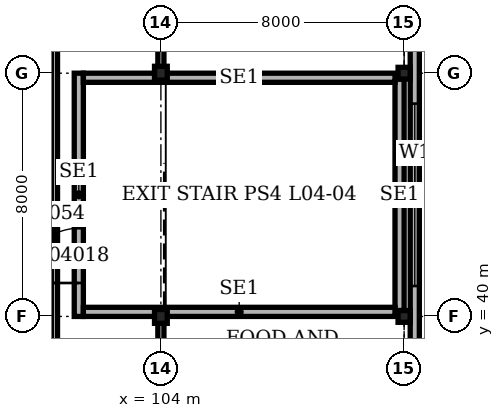
"""IFC4 building model, lengths in metres.
Left out: names, types, materials, properties, quantities, classifications, styles, units other than length and angle.
Written with IfcOpenShell. Run it as: python <this file> out.ifc"""

import sys

from ifc_helpers import new_model, si_unit, direction, frame, frame_2d, origin, origin_2d, place, context, subcontext, project, spatial, rectangle, i_section, extrude, element, fill, save


model = new_model("IFC4")
c1 = context("Model", 3, precision=1e-05, world=origin(), true_north=direction((0.0, 1.0)))
c2 = subcontext(c1, "Body", "Model", "MODEL_VIEW")
j1 = project(units=[si_unit("LENGTHUNIT", "METRE"), si_unit("PLANEANGLEUNIT", "RADIAN")], contexts=[c1])
p1 = place(None, origin())
s1 = spatial("IfcSite", under=j1, at=p1, CompositionType="ELEMENT")
p2 = place(p1, origin())
s2 = spatial("IfcBuilding", under=s1, at=p2, CompositionType="ELEMENT")
p3 = place(p2, frame((0.0, 0.0, 19.9)))
s3 = spatial("IfcBuildingStorey", under=s2, at=p3, CompositionType="ELEMENT", Elevation=19.9)
for number, where, z_axis, x_axis in (
    (1, (104.0, 40.0, 0.0), (0.0, 0.0, 1.0), (1.0, 0.0, 0.0)),
    (2, (104.0, 48.0, 0.0), (0.0, 0.0, 1.0), (1.0, 0.0, 0.0)),
):
    element("IfcColumn", number, at=place(p3, frame(where, z_axis=z_axis, x_axis=x_axis)), inside=s3, PredefinedType="COLUMN", context=c2, shape_type="SweptSolid", body=[
        extrude(i_section(OverallWidth=0.419, OverallDepth=0.455, WebThickness=0.042, FlangeThickness=0.068, at=origin_2d()), origin(), (0.0, 0.0, 1.0), 6.0),
    ])
for number, where, z_axis, x_axis in (
    (3, (112.0, 40.0, 0.0), (0.0, 0.0, 1.0), (1.0, 0.0, 0.0)),
    (4, (112.0, 48.0, 0.0), (0.0, 0.0, 1.0), (1.0, 0.0, 0.0)),
):
    element("IfcColumn", number, at=place(p3, frame(where, z_axis=z_axis, x_axis=x_axis)), inside=s3, PredefinedType="COLUMN", context=c2, shape_type="SweptSolid", body=[
        extrude(i_section(OverallWidth=0.399, OverallDepth=0.386, WebThickness=0.021, FlangeThickness=0.033, at=origin_2d()), origin(), (0.0, 0.0, 1.0), 6.0),
    ])
p4 = place(p3, frame((112.35, -0.35, 0.0), z_axis=(0.0, 0.0, 1.0), x_axis=(0.0, 1.0, 0.0)))
e5 = element("IfcWall", 5, at=p4, inside=s3, PredefinedType="SOLIDWALL", context=c2, shape_type="SweptSolid", body=[
    extrude(rectangle(XDim=112.7, YDim=0.3, at=frame_2d((56.35, 0.0))), origin(), (0.0, 0.0, 1.0), 6.0),
])
p5 = place(p4, frame((1.35, 0.0, 1.0)))
e6 = element("IfcOpeningElement", 6, at=p5, cuts=e5, PredefinedType="OPENING", context=c2, shape_type="SweptSolid", body=[
    extrude(rectangle(XDim=6.0, YDim=1.5, at=frame_2d((3.0, 0.75))), frame((0.0, 0.16, 0.0), z_axis=(0.0, -1.0, 0.0), x_axis=(1.0, 0.0, 0.0)), (0.0, 0.0, 1.0), 0.32),
])
p6 = place(p4, frame((9.35, 0.0, 1.0)))
e7 = element("IfcOpeningElement", 7, at=p6, cuts=e5, PredefinedType="OPENING", context=c2, shape_type="SweptSolid", body=[
    extrude(rectangle(XDim=6.0, YDim=1.5, at=frame_2d((3.0, 0.75))), frame((0.0, 0.16, 0.0), z_axis=(0.0, -1.0, 0.0), x_axis=(1.0, 0.0, 0.0)), (0.0, 0.0, 1.0), 0.32),
])
p7 = place(p4, frame((17.35, 0.0, 1.0)))
e8 = element("IfcOpeningElement", 8, at=p7, cuts=e5, PredefinedType="OPENING", context=c2, shape_type="SweptSolid", body=[
    extrude(rectangle(XDim=6.0, YDim=1.5, at=frame_2d((3.0, 0.75))), frame((0.0, 0.16, 0.0), z_axis=(0.0, -1.0, 0.0), x_axis=(1.0, 0.0, 0.0)), (0.0, 0.0, 1.0), 0.32),
])
p8 = place(p4, frame((25.35, 0.0, 1.0)))
e9 = element("IfcOpeningElement", 9, at=p8, cuts=e5, PredefinedType="OPENING", context=c2, shape_type="SweptSolid", body=[
    extrude(rectangle(XDim=6.0, YDim=1.5, at=frame_2d((3.0, 0.75))), frame((0.0, 0.16, 0.0), z_axis=(0.0, -1.0, 0.0), x_axis=(1.0, 0.0, 0.0)), (0.0, 0.0, 1.0), 0.32),
])
p9 = place(p4, frame((33.35, 0.0, 1.0)))
e10 = element("IfcOpeningElement", 10, at=p9, cuts=e5, PredefinedType="OPENING", context=c2, shape_type="SweptSolid", body=[
    extrude(rectangle(XDim=6.0, YDim=1.5, at=frame_2d((3.0, 0.75))), frame((0.0, 0.16, 0.0), z_axis=(0.0, -1.0, 0.0), x_axis=(1.0, 0.0, 0.0)), (0.0, 0.0, 1.0), 0.32),
])
p10 = place(p4, frame((41.35, 0.0, 1.0)))
e11 = element("IfcOpeningElement", 11, at=p10, cuts=e5, PredefinedType="OPENING", context=c2, shape_type="SweptSolid", body=[
    extrude(rectangle(XDim=6.0, YDim=1.5, at=frame_2d((3.0, 0.75))), frame((0.0, 0.16, 0.0), z_axis=(0.0, -1.0, 0.0), x_axis=(1.0, 0.0, 0.0)), (0.0, 0.0, 1.0), 0.32),
])
p11 = place(p4, frame((49.35, 0.0, 1.0)))
e12 = element("IfcOpeningElement", 12, at=p11, cuts=e5, PredefinedType="OPENING", context=c2, shape_type="SweptSolid", body=[
    extrude(rectangle(XDim=6.0, YDim=1.5, at=frame_2d((3.0, 0.75))), frame((0.0, 0.16, 0.0), z_axis=(0.0, -1.0, 0.0), x_axis=(1.0, 0.0, 0.0)), (0.0, 0.0, 1.0), 0.32),
])
p12 = place(p4, frame((57.35, 0.0, 1.0)))
e13 = element("IfcOpeningElement", 13, at=p12, cuts=e5, PredefinedType="OPENING", context=c2, shape_type="SweptSolid", body=[
    extrude(rectangle(XDim=6.0, YDim=1.5, at=frame_2d((3.0, 0.75))), frame((0.0, 0.16, 0.0), z_axis=(0.0, -1.0, 0.0), x_axis=(1.0, 0.0, 0.0)), (0.0, 0.0, 1.0), 0.32),
])
p13 = place(p4, frame((65.35, 0.0, 1.0)))
e14 = element("IfcOpeningElement", 14, at=p13, cuts=e5, PredefinedType="OPENING", context=c2, shape_type="SweptSolid", body=[
    extrude(rectangle(XDim=6.0, YDim=1.5, at=frame_2d((3.0, 0.75))), frame((0.0, 0.16, 0.0), z_axis=(0.0, -1.0, 0.0), x_axis=(1.0, 0.0, 0.0)), (0.0, 0.0, 1.0), 0.32),
])
p14 = place(p4, frame((73.35, 0.0, 1.0)))
e15 = element("IfcOpeningElement", 15, at=p14, cuts=e5, PredefinedType="OPENING", context=c2, shape_type="SweptSolid", body=[
    extrude(rectangle(XDim=6.0, YDim=1.5, at=frame_2d((3.0, 0.75))), frame((0.0, 0.16, 0.0), z_axis=(0.0, -1.0, 0.0), x_axis=(1.0, 0.0, 0.0)), (0.0, 0.0, 1.0), 0.32),
])
p15 = place(p4, frame((81.35, 0.0, 1.0)))
e16 = element("IfcOpeningElement", 16, at=p15, cuts=e5, PredefinedType="OPENING", context=c2, shape_type="SweptSolid", body=[
    extrude(rectangle(XDim=6.0, YDim=1.5, at=frame_2d((3.0, 0.75))), frame((0.0, 0.16, 0.0), z_axis=(0.0, -1.0, 0.0), x_axis=(1.0, 0.0, 0.0)), (0.0, 0.0, 1.0), 0.32),
])
p16 = place(p4, frame((89.35, 0.0, 1.0)))
e17 = element("IfcOpeningElement", 17, at=p16, cuts=e5, PredefinedType="OPENING", context=c2, shape_type="SweptSolid", body=[
    extrude(rectangle(XDim=6.0, YDim=1.5, at=frame_2d((3.0, 0.75))), frame((0.0, 0.16, 0.0), z_axis=(0.0, -1.0, 0.0), x_axis=(1.0, 0.0, 0.0)), (0.0, 0.0, 1.0), 0.32),
])
p17 = place(p4, frame((97.35, 0.0, 1.0)))
e18 = element("IfcOpeningElement", 18, at=p17, cuts=e5, PredefinedType="OPENING", context=c2, shape_type="SweptSolid", body=[
    extrude(rectangle(XDim=6.0, YDim=1.5, at=frame_2d((3.0, 0.75))), frame((0.0, 0.16, 0.0), z_axis=(0.0, -1.0, 0.0), x_axis=(1.0, 0.0, 0.0)), (0.0, 0.0, 1.0), 0.32),
])
p18 = place(p4, frame((105.35, 0.0, 1.0)))
e19 = element("IfcOpeningElement", 19, at=p18, cuts=e5, PredefinedType="OPENING", context=c2, shape_type="SweptSolid", body=[
    extrude(rectangle(XDim=6.0, YDim=1.5, at=frame_2d((3.0, 0.75))), frame((0.0, 0.16, 0.0), z_axis=(0.0, -1.0, 0.0), x_axis=(1.0, 0.0, 0.0)), (0.0, 0.0, 1.0), 0.32),
])
p19 = place(p3, frame((101.3, 40.0, 0.0), z_axis=(0.0, 0.0, 1.0), x_axis=(0.0, 1.0, 0.0)))
e20 = element("IfcWall", 20, at=p19, inside=s3, PredefinedType="SOLIDWALL", context=c2, shape_type="SweptSolid", body=[
    extrude(rectangle(XDim=8.0, YDim=0.3, at=frame_2d((4.0, 0.0))), origin(), (0.0, 0.0, 1.0), 5.75),
])
p20 = place(p19, frame((1.1, 0.0, 0.0)))
e21 = element("IfcOpeningElement", 21, at=p20, cuts=e20, PredefinedType="OPENING", context=c2, shape_type="SweptSolid", body=[
    extrude(rectangle(XDim=1.8, YDim=2.1, at=frame_2d((0.9, 1.05))), frame((0.0, 0.16, 0.0), z_axis=(0.0, -1.0, 0.0), x_axis=(1.0, 0.0, 0.0)), (0.0, 0.0, 1.0), 0.32),
])
p21 = place(p3, frame((111.85, 40.193, 0.0), z_axis=(0.0, 0.0, 1.0), x_axis=(0.0, 1.0, 0.0)))
e22 = element("IfcWall", 22, at=p21, inside=s3, PredefinedType="SOLIDWALL", context=c2, shape_type="SweptSolid", body=[
    extrude(rectangle(XDim=7.614, YDim=0.3, at=frame_2d((3.807, 0.0))), origin(), (0.0, 0.0, 1.0), 5.75),
])
for number, where, z_axis, x_axis in (
    (23, (101.45, 40.15, 0.0), (0.0, 0.0, 1.0), (1.0, 0.0, 0.0)),
    (24, (101.45, 47.85, 0.0), (0.0, 0.0, 1.0), (1.0, 0.0, 0.0)),
):
    element("IfcWall", number, at=place(p3, frame(where, z_axis=z_axis, x_axis=x_axis)), inside=s3, PredefinedType="SOLIDWALL", context=c2, shape_type="SweptSolid", body=[
        extrude(rectangle(XDim=10.25, YDim=0.3, at=frame_2d((5.125, 0.0))), origin(), (0.0, 0.0, 1.0), 5.75),
    ])
p22 = place(p3, frame((100.5, 8.6, 0.0), z_axis=(0.0, 0.0, 1.0), x_axis=(0.0, 1.0, 0.0)))
e25 = element("IfcWall", 25, at=p22, inside=s3, PredefinedType="PARTITIONING", context=c2, shape_type="SweptSolid", body=[
    extrude(rectangle(XDim=55.3, YDim=0.2, at=frame_2d((27.65, 0.0))), origin(), (0.0, 0.0, 1.0), 5.75),
])
p23 = place(p22, frame((1.0, 0.0, 0.0)))
e26 = element("IfcOpeningElement", 26, at=p23, cuts=e25, PredefinedType="OPENING", context=c2, shape_type="SweptSolid", body=[
    extrude(rectangle(XDim=1.8, YDim=2.4, at=frame_2d((0.9, 1.2))), frame((0.0, 0.11, 0.0), z_axis=(0.0, -1.0, 0.0), x_axis=(1.0, 0.0, 0.0)), (0.0, 0.0, 1.0), 0.22),
])
p24 = place(p22, frame((8.5, 0.0, 0.0)))
e27 = element("IfcOpeningElement", 27, at=p24, cuts=e25, PredefinedType="OPENING", context=c2, shape_type="SweptSolid", body=[
    extrude(rectangle(XDim=1.8, YDim=2.4, at=frame_2d((0.9, 1.2))), frame((0.0, 0.11, 0.0), z_axis=(0.0, -1.0, 0.0), x_axis=(1.0, 0.0, 0.0)), (0.0, 0.0, 1.0), 0.22),
])
p25 = place(p22, frame((16.5, 0.0, 0.0)))
e28 = element("IfcOpeningElement", 28, at=p25, cuts=e25, PredefinedType="OPENING", context=c2, shape_type="SweptSolid", body=[
    extrude(rectangle(XDim=1.8, YDim=2.4, at=frame_2d((0.9, 1.2))), frame((0.0, 0.11, 0.0), z_axis=(0.0, -1.0, 0.0), x_axis=(1.0, 0.0, 0.0)), (0.0, 0.0, 1.0), 0.22),
])
p26 = place(p22, frame((24.5, 0.0, 0.0)))
e29 = element("IfcOpeningElement", 29, at=p26, cuts=e25, PredefinedType="OPENING", context=c2, shape_type="SweptSolid", body=[
    extrude(rectangle(XDim=1.8, YDim=2.4, at=frame_2d((0.9, 1.2))), frame((0.0, 0.11, 0.0), z_axis=(0.0, -1.0, 0.0), x_axis=(1.0, 0.0, 0.0)), (0.0, 0.0, 1.0), 0.22),
])
p27 = place(p22, frame((32.5, 0.0, 0.0)))
e30 = element("IfcOpeningElement", 30, at=p27, cuts=e25, PredefinedType="OPENING", context=c2, shape_type="SweptSolid", body=[
    extrude(rectangle(XDim=1.8, YDim=2.4, at=frame_2d((0.9, 1.2))), frame((0.0, 0.11, 0.0), z_axis=(0.0, -1.0, 0.0), x_axis=(1.0, 0.0, 0.0)), (0.0, 0.0, 1.0), 0.22),
])
p28 = place(p22, frame((40.5, 0.0, 0.0)))
e31 = element("IfcOpeningElement", 31, at=p28, cuts=e25, PredefinedType="OPENING", context=c2, shape_type="SweptSolid", body=[
    extrude(rectangle(XDim=1.8, YDim=2.4, at=frame_2d((0.9, 1.2))), frame((0.0, 0.11, 0.0), z_axis=(0.0, -1.0, 0.0), x_axis=(1.0, 0.0, 0.0)), (0.0, 0.0, 1.0), 0.22),
])
p29 = place(p22, frame((48.5, 0.0, 0.0)))
e32 = element("IfcOpeningElement", 32, at=p29, cuts=e25, PredefinedType="OPENING", context=c2, shape_type="SweptSolid", body=[
    extrude(rectangle(XDim=1.8, YDim=2.4, at=frame_2d((0.9, 1.2))), frame((0.0, 0.11, 0.0), z_axis=(0.0, -1.0, 0.0), x_axis=(1.0, 0.0, 0.0)), (0.0, 0.0, 1.0), 0.22),
])
p30 = place(p3, frame((104.0, -0.15, 0.0), z_axis=(0.0, 0.0, 1.0), x_axis=(0.0, 1.0, 0.0)))
e33 = element("IfcWall", 33, at=p30, inside=s3, PredefinedType="PARTITIONING", context=c2, shape_type="SweptSolid", body=[
    extrude(rectangle(XDim=40.05, YDim=0.2, at=frame_2d((20.025, 0.0))), origin(), (0.0, 0.0, 1.0), 4.978),
])
p31 = place(p30, frame((17.55, 0.0, 0.0)))
e34 = element("IfcOpeningElement", 34, at=p31, cuts=e33, PredefinedType="OPENING", context=c2, shape_type="SweptSolid", body=[
    extrude(rectangle(XDim=1.2, YDim=2.1, at=frame_2d((0.6, 1.05))), frame((0.0, 0.11, 0.0), z_axis=(0.0, -1.0, 0.0), x_axis=(1.0, 0.0, 0.0)), (0.0, 0.0, 1.0), 0.22),
])
p32 = place(p30, frame((27.05, 0.0, 0.0)))
e35 = element("IfcOpeningElement", 35, at=p32, cuts=e33, PredefinedType="OPENING", context=c2, shape_type="SweptSolid", body=[
    extrude(rectangle(XDim=1.2, YDim=2.1, at=frame_2d((0.6, 1.05))), frame((0.0, 0.11, 0.0), z_axis=(0.0, -1.0, 0.0), x_axis=(1.0, 0.0, 0.0)), (0.0, 0.0, 1.0), 0.22),
])
p33 = place(p30, frame((33.55, 0.0, 0.0)))
e36 = element("IfcOpeningElement", 36, at=p33, cuts=e33, PredefinedType="OPENING", context=c2, shape_type="SweptSolid", body=[
    extrude(rectangle(XDim=1.2, YDim=2.1, at=frame_2d((0.6, 1.05))), frame((0.0, 0.11, 0.0), z_axis=(0.0, -1.0, 0.0), x_axis=(1.0, 0.0, 0.0)), (0.0, 0.0, 1.0), 0.22),
])
p34 = place(p30, frame((1.65, 0.0, 0.0)))
e37 = element("IfcOpeningElement", 37, at=p34, cuts=e33, PredefinedType="OPENING", context=c2, shape_type="SweptSolid", body=[
    extrude(rectangle(XDim=1.0, YDim=2.1, at=frame_2d((0.5, 1.05))), frame((0.0, 0.11, 0.0), z_axis=(0.0, -1.0, 0.0), x_axis=(1.0, 0.0, 0.0)), (0.0, 0.0, 1.0), 0.22),
])
p35 = place(p30, frame((9.65, 0.0, 0.0)))
e38 = element("IfcOpeningElement", 38, at=p35, cuts=e33, PredefinedType="OPENING", context=c2, shape_type="SweptSolid", body=[
    extrude(rectangle(XDim=1.0, YDim=2.1, at=frame_2d((0.5, 1.05))), frame((0.0, 0.11, 0.0), z_axis=(0.0, -1.0, 0.0), x_axis=(1.0, 0.0, 0.0)), (0.0, 0.0, 1.0), 0.22),
])
p36 = place(p30, frame((37.65, 0.0, 0.0)))
e39 = element("IfcOpeningElement", 39, at=p36, cuts=e33, PredefinedType="OPENING", context=c2, shape_type="SweptSolid", body=[
    extrude(rectangle(XDim=1.0, YDim=2.1, at=frame_2d((0.5, 1.05))), frame((0.0, 0.11, 0.0), z_axis=(0.0, -1.0, 0.0), x_axis=(1.0, 0.0, 0.0)), (0.0, 0.0, 1.0), 0.22),
])
p37 = place(p3, frame((104.0, 48.1, 0.0), z_axis=(0.0, 0.0, 1.0), x_axis=(0.0, 1.0, 0.0)))
e40 = element("IfcWall", 40, at=p37, inside=s3, PredefinedType="PARTITIONING", context=c2, shape_type="SweptSolid", body=[
    extrude(rectangle(XDim=7.8, YDim=0.2, at=frame_2d((3.9, 0.0))), origin(), (0.0, 0.0, 1.0), 4.978),
])
p38 = place(p37, frame((1.4, 0.0, 0.0)))
e41 = element("IfcOpeningElement", 41, at=p38, cuts=e40, PredefinedType="OPENING", context=c2, shape_type="SweptSolid", body=[
    extrude(rectangle(XDim=1.0, YDim=2.1, at=frame_2d((0.5, 1.05))), frame((0.0, 0.11, 0.0), z_axis=(0.0, -1.0, 0.0), x_axis=(1.0, 0.0, 0.0)), (0.0, 0.0, 1.0), 0.22),
])
p39 = place(p10, origin())
e42 = element("IfcWindow", 42, at=p39, inside=s3, PartitioningType="SINGLE_PANEL", PredefinedType="WINDOW", context=c2, shape_type="SweptSolid", body=[
    extrude(rectangle(XDim=6.0, YDim=1.5, at=frame_2d((3.0, 0.75))), frame((0.0, 0.03, 0.0), z_axis=(0.0, -1.0, 0.0), x_axis=(1.0, 0.0, 0.0)), (0.0, 0.0, 1.0), 0.06),
])
fill(e11, e42)
p40 = place(p20, origin())
e43 = element("IfcDoor", 43, at=p40, inside=s3, OperationType="DOUBLE_DOOR_SINGLE_SWING", PredefinedType="DOOR", context=c2, shape_type="SweptSolid", body=[
    extrude(rectangle(XDim=1.8, YDim=2.1, at=frame_2d((0.9, 1.05))), frame((0.0, 0.15, 0.0), z_axis=(0.0, -1.0, 0.0), x_axis=(1.0, 0.0, 0.0)), (0.0, 0.0, 1.0), 0.3),
])
fill(e21, e43)
p41 = place(p27, origin())
e44 = element("IfcDoor", 44, at=p41, inside=s3, OperationType="DOUBLE_DOOR_DOUBLE_SWING", PredefinedType="DOOR", context=c2, shape_type="SweptSolid", body=[
    extrude(rectangle(XDim=1.8, YDim=2.4, at=frame_2d((0.9, 1.2))), frame((0.0, 0.1, 0.0), z_axis=(0.0, -1.0, 0.0), x_axis=(1.0, 0.0, 0.0)), (0.0, 0.0, 1.0), 0.199),
])
fill(e30, e44)
save(model, sys.argv[1])
